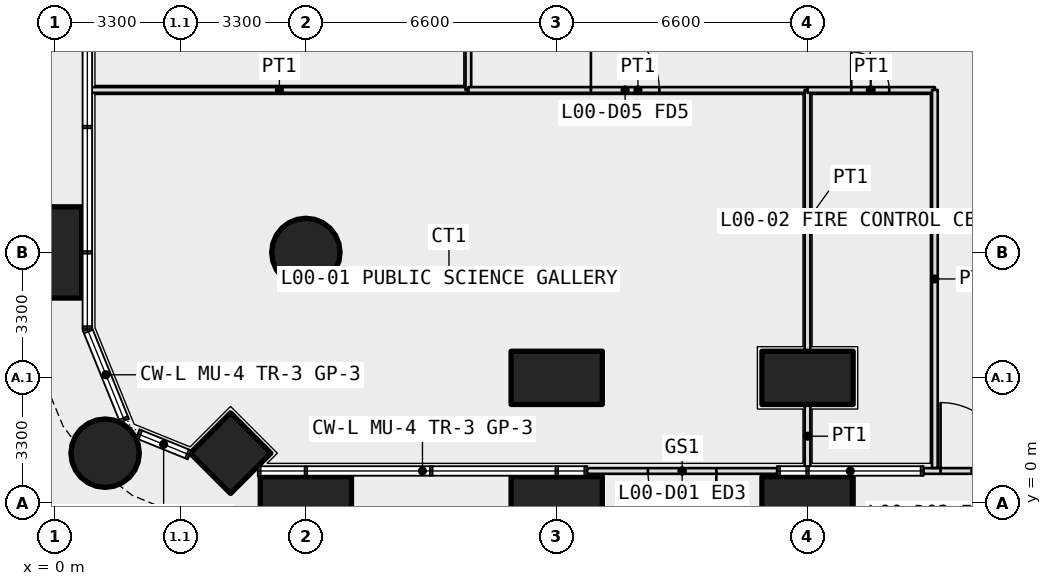
"""IFC4 building model, lengths in metres.
Left out: names, types, materials, properties, quantities, classifications, styles, units other than length and angle.
Written with IfcOpenShell. Run it as: python <this file> out.ifc"""

import sys

from ifc_helpers import new_model, si_unit, direction, frame, frame_2d, origin, origin_2d, place, context, subcontext, project, spatial, rectangle, circle, extrude, element, fill, save


model = new_model("IFC4")
c1 = context("Model", 3, precision=1e-05, world=origin(), true_north=direction((0.0, 1.0)))
c2 = subcontext(c1, "Body", "Model", "MODEL_VIEW")
j1 = project(units=[si_unit("LENGTHUNIT", "METRE"), si_unit("PLANEANGLEUNIT", "RADIAN")], contexts=[c1])
p1 = place(None, origin())
s1 = spatial("IfcSite", under=j1, at=p1, CompositionType="ELEMENT")
p2 = place(p1, origin())
s2 = spatial("IfcBuilding", under=s1, at=p2, CompositionType="ELEMENT")
p3 = place(p2, origin())
s3 = spatial("IfcBuildingStorey", under=s2, at=p3, CompositionType="ELEMENT", Elevation=0.0)
p4 = place(p3, frame((1.318, 1.318, 0.0), z_axis=(0.0, 0.0, 1.0), x_axis=(1.0, 0.0, 0.0)))
e1 = element("IfcColumn", 1, at=p4, inside=s3, PredefinedType="COLUMN", context=c2, shape_type="SweptSolid", body=[
    extrude(circle(Radius=0.9, at=origin_2d()), origin(), (0.0, 0.0, 1.0), 7.2),
])
for number, where, z_axis, x_axis in (
    (2, (6.6, 0.0, 0.0), (0.0, 0.0, 1.0), (1.0, 0.0, 0.0)),
    (3, (13.2, 0.0, 0.0), (0.0, 0.0, 1.0), (1.0, 0.0, 0.0)),
    (4, (19.8, 0.0, 0.0), (0.0, 0.0, 1.0), (1.0, 0.0, 0.0)),
    (5, (0.0, 6.6, 0.0), (0.0, 0.0, 1.0), (0.0, 1.0, 0.0)),
):
    element("IfcColumn", number, at=place(p3, frame(where, z_axis=z_axis, x_axis=x_axis)), inside=s3, PredefinedType="COLUMN", context=c2, shape_type="SweptSolid", body=[
        extrude(rectangle(XDim=2.4, YDim=1.4, at=origin_2d()), origin(), (0.0, 0.0, 1.0), 7.2),
    ])
p5 = place(p3, frame((6.6, 6.6, 0.0), z_axis=(0.0, 0.0, 1.0), x_axis=(1.0, 0.0, 0.0)))
e6 = element("IfcColumn", 6, at=p5, inside=s3, PredefinedType="COLUMN", context=c2, shape_type="SweptSolid", body=[
    extrude(circle(Radius=0.9, at=origin_2d()), origin(), (0.0, 0.0, 1.0), 7.2),
])
p6 = place(p3, frame((4.618, 1.318, 0.0), z_axis=(0.0, 0.0, 1.0), x_axis=(0.707106781187, 0.707106781187, 0.0)))
e7 = element("IfcColumn", 7, at=p6, inside=s3, PredefinedType="COLUMN", context=c2, shape_type="SweptSolid", body=[
    extrude(rectangle(XDim=1.5, YDim=1.5, at=origin_2d()), origin(), (0.0, 0.0, 1.0), 7.2),
])
for number, where, z_axis, x_axis in (
    (8, (13.2, 3.3, 0.0), (0.0, 0.0, 1.0), (1.0, 0.0, 0.0)),
    (9, (19.8, 3.3, 0.0), (0.0, 0.0, 1.0), (1.0, 0.0, 0.0)),
):
    element("IfcColumn", number, at=place(p3, frame(where, z_axis=z_axis, x_axis=x_axis)), inside=s3, PredefinedType="COLUMN", context=c2, shape_type="SweptSolid", body=[
        extrude(rectangle(XDim=2.4, YDim=1.4, at=origin_2d()), origin(), (0.0, 0.0, 1.0), 7.2),
    ])
p7 = place(p3, frame((22.85, 0.85, 0.0), z_axis=(0.0, 0.0, 1.0), x_axis=(1.0, 0.0, 0.0)))
e10 = element("IfcWall", 10, at=p7, inside=s3, PredefinedType="SOLIDWALL", context=c2, shape_type="SweptSolid", body=[
    extrude(rectangle(XDim=7.1, YDim=0.15, at=frame_2d((3.55, 0.0))), origin(), (0.0, 0.0, 1.0), 5.85),
])
p8 = place(p7, frame((0.45, 0.0, 0.0)))
e11 = element("IfcOpeningElement", 11, at=p8, cuts=e10, PredefinedType="OPENING", context=c2, shape_type="SweptSolid", body=[
    extrude(rectangle(XDim=1.8, YDim=3.0, at=frame_2d((0.9, 1.5))), frame((0.0, 0.085, 0.0), z_axis=(0.0, -1.0, 0.0), x_axis=(1.0, 0.0, 0.0)), (0.0, 0.0, 1.0), 0.17),
])
p9 = place(p7, frame((4.85, 0.0, 0.0)))
e12 = element("IfcOpeningElement", 12, at=p9, cuts=e10, PredefinedType="OPENING", context=c2, shape_type="SweptSolid", body=[
    extrude(rectangle(XDim=1.8, YDim=3.0, at=frame_2d((0.9, 1.5))), frame((0.0, 0.085, 0.0), z_axis=(0.0, -1.0, 0.0), x_axis=(1.0, 0.0, 0.0)), (0.0, 0.0, 1.0), 0.17),
])
p10 = place(p3, frame((19.0, 0.85, 0.0), z_axis=(0.0, 0.0, 1.0), x_axis=(-1.0, 0.0, 0.0)))
e13 = element("IfcWall", 13, at=p10, inside=s3, PredefinedType="SOLIDWALL", context=c2, shape_type="SweptSolid", body=[
    extrude(rectangle(XDim=5.0, YDim=0.15, at=frame_2d((2.5, 0.0))), origin(), (0.0, 0.0, 1.0), 6.9),
])
p11 = place(p10, frame((1.6, 0.0, 0.0)))
e14 = element("IfcOpeningElement", 14, at=p11, cuts=e13, PredefinedType="OPENING", context=c2, shape_type="SweptSolid", body=[
    extrude(rectangle(XDim=1.8, YDim=2.4, at=frame_2d((0.9, 1.2))), frame((0.0, 0.085, 0.0), z_axis=(0.0, -1.0, 0.0), x_axis=(1.0, 0.0, 0.0)), (0.0, 0.0, 1.0), 0.17),
])
p12 = place(p3, frame((0.93, 10.875, 0.0), z_axis=(0.0, 0.0, 1.0), x_axis=(1.0, 0.0, 0.0)))
e15 = element("IfcWall", 15, at=p12, inside=s3, PredefinedType="PARTITIONING", context=c2, shape_type="SweptSolid", body=[
    extrude(rectangle(XDim=9.945, YDim=0.15, at=frame_2d((4.973, 0.0))), origin(), (0.0, 0.0, 1.0), 5.85),
])
p13 = place(p3, frame((10.875, 16.5, 0.0), z_axis=(0.0, 0.0, 1.0), x_axis=(0.0, -1.0, 0.0)))
e16 = element("IfcWall", 16, at=p13, inside=s3, PredefinedType="PARTITIONING", context=c2, shape_type="SweptSolid", body=[
    extrude(rectangle(XDim=5.625, YDim=0.15, at=frame_2d((2.812, 0.0))), origin(), (0.0, 0.0, 1.0), 4.5),
])
p14 = place(p13, frame((3.0, 0.0, 0.0)))
e17 = element("IfcOpeningElement", 17, at=p14, cuts=e16, PredefinedType="OPENING", context=c2, shape_type="SweptSolid", body=[
    extrude(rectangle(XDim=1.0, YDim=2.1, at=frame_2d((0.5, 1.05))), frame((0.0, 0.085, 0.0), z_axis=(0.0, -1.0, 0.0), x_axis=(1.0, 0.0, 0.0)), (0.0, 0.0, 1.0), 0.17),
])
p15 = place(p3, frame((10.875, 10.875, 0.0), z_axis=(0.0, 0.0, 1.0), x_axis=(1.0, 0.0, 0.0)))
e18 = element("IfcWall", 18, at=p15, inside=s3, PredefinedType="PARTITIONING", context=c2, shape_type="SweptSolid", body=[
    extrude(rectangle(XDim=8.925, YDim=0.15, at=frame_2d((4.462, 0.0))), origin(), (0.0, 0.0, 1.0), 4.5),
])
p16 = place(p15, frame((3.225, 0.0, 0.0)))
e19 = element("IfcOpeningElement", 19, at=p16, cuts=e18, PredefinedType="OPENING", context=c2, shape_type="SweptSolid", body=[
    extrude(rectangle(XDim=1.8, YDim=2.1, at=frame_2d((0.9, 1.05))), frame((0.0, 0.085, 0.0), z_axis=(0.0, -1.0, 0.0), x_axis=(1.0, 0.0, 0.0)), (0.0, 0.0, 1.0), 0.17),
])
p17 = place(p3, frame((19.8, 10.875, 0.0), z_axis=(0.0, 0.0, 1.0), x_axis=(0.0, -1.0, 0.0)))
e20 = element("IfcWall", 20, at=p17, inside=s3, PredefinedType="PARTITIONING", context=c2, shape_type="SweptSolid", body=[
    extrude(rectangle(XDim=6.875, YDim=0.15, at=frame_2d((3.438, 0.0))), origin(), (0.0, 0.0, 1.0), 5.85),
])
p18 = place(p3, frame((19.8, 2.6, 0.0), z_axis=(0.0, 0.0, 1.0), x_axis=(0.0, -1.0, 0.0)))
e21 = element("IfcWall", 21, at=p18, inside=s3, PredefinedType="PARTITIONING", context=c2, shape_type="SweptSolid", body=[
    extrude(rectangle(XDim=1.67, YDim=0.15, at=frame_2d((0.835, 0.0))), origin(), (0.0, 0.0, 1.0), 5.85),
])
p19 = place(p3, frame((19.8, 10.875, 0.0), z_axis=(0.0, 0.0, 1.0), x_axis=(1.0, 0.0, 0.0)))
e22 = element("IfcWall", 22, at=p19, inside=s3, PredefinedType="PARTITIONING", context=c2, shape_type="SweptSolid", body=[
    extrude(rectangle(XDim=3.35, YDim=0.15, at=frame_2d((1.675, 0.0))), origin(), (0.0, 0.0, 1.0), 5.85),
])
p20 = place(p19, frame((1.15, 0.0, 0.0)))
e23 = element("IfcOpeningElement", 23, at=p20, cuts=e22, PredefinedType="OPENING", context=c2, shape_type="SweptSolid", body=[
    extrude(rectangle(XDim=1.0, YDim=2.1, at=frame_2d((0.5, 1.05))), frame((0.0, 0.085, 0.0), z_axis=(0.0, -1.0, 0.0), x_axis=(1.0, 0.0, 0.0)), (0.0, 0.0, 1.0), 0.17),
])
p21 = place(p3, frame((23.15, 10.875, 0.0), z_axis=(0.0, 0.0, 1.0), x_axis=(0.0, -1.0, 0.0)))
e24 = element("IfcWall", 24, at=p21, inside=s3, PredefinedType="PARTITIONING", context=c2, shape_type="SweptSolid", body=[
    extrude(rectangle(XDim=9.945, YDim=0.15, at=frame_2d((4.973, 0.0))), origin(), (0.0, 0.0, 1.0), 6.9),
])
p22 = place(p8, origin())
e25 = element("IfcDoor", 25, at=p22, inside=s3, OperationType="DOUBLE_DOOR_DOUBLE_SWING", PredefinedType="DOOR", context=c2, shape_type="SweptSolid", body=[
    extrude(rectangle(XDim=1.8, YDim=3.0, at=frame_2d((0.9, 1.5))), frame((0.0, 0.025, 0.0), z_axis=(0.0, -1.0, 0.0), x_axis=(1.0, 0.0, 0.0)), (0.0, 0.0, 1.0), 0.05),
])
fill(e11, e25)
p23 = place(p11, origin())
e26 = element("IfcDoor", 26, at=p23, inside=s3, OperationType="DOUBLE_DOOR_SINGLE_SWING", PredefinedType="DOOR", context=c2, shape_type="SweptSolid", body=[
    extrude(rectangle(XDim=1.8, YDim=2.4, at=frame_2d((0.9, 1.2))), frame((0.0, 0.025, 0.0), z_axis=(0.0, -1.0, 0.0), x_axis=(1.0, 0.0, 0.0)), (0.0, 0.0, 1.0), 0.05),
])
fill(e14, e26)
p24 = place(p16, origin())
e27 = element("IfcDoor", 27, at=p24, inside=s3, OperationType="DOUBLE_DOOR_DOUBLE_SWING", PredefinedType="DOOR", context=c2, shape_type="SweptSolid", body=[
    extrude(rectangle(XDim=1.8, YDim=2.1, at=frame_2d((0.9, 1.05))), frame((0.0, 0.025, 0.0), z_axis=(0.0, -1.0, 0.0), x_axis=(1.0, 0.0, 0.0)), (0.0, 0.0, 1.0), 0.05),
])
fill(e19, e27)
p25 = place(p20, origin())
e28 = element("IfcDoor", 28, at=p25, inside=s3, OperationType="SINGLE_SWING_LEFT", PredefinedType="DOOR", context=c2, shape_type="SweptSolid", body=[
    extrude(rectangle(XDim=1.0, YDim=2.1, at=frame_2d((0.5, 1.05))), frame((0.0, 0.025, 0.0), z_axis=(0.0, -1.0, 0.0), x_axis=(1.0, 0.0, 0.0)), (0.0, 0.0, 1.0), 0.05),
])
fill(e23, e28)
save(model, sys.argv[1])
